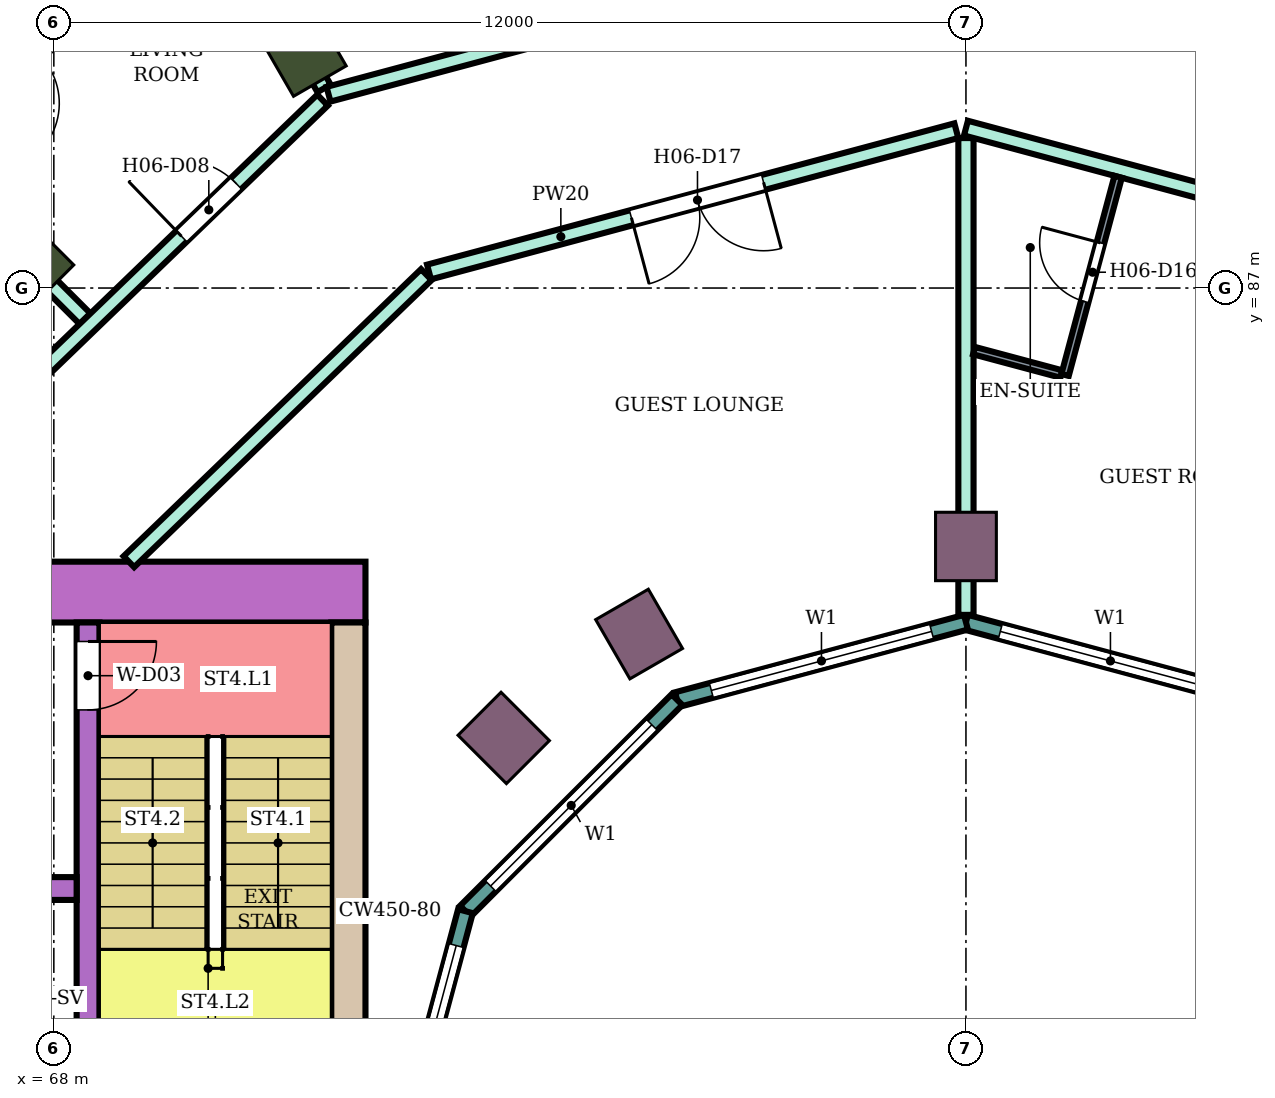
"""IFC4 building model, lengths in metres.
Left out: names, types, materials, properties, quantities, classifications, styles, units other than length and angle.
Written with IfcOpenShell. Run it as: python <this file> out.ifc"""

import sys

from ifc_helpers import new_model, si_unit, direction, frame, frame_2d, origin, origin_2d, place, context, subcontext, project, spatial, rectangle, extrude, element, fill, save


model = new_model("IFC4")
c1 = context("Model", 3, precision=1e-05, world=origin(), true_north=direction((0.0, 1.0)))
c2 = subcontext(c1, "Body", "Model", "MODEL_VIEW")
j1 = project(units=[si_unit("LENGTHUNIT", "METRE"), si_unit("PLANEANGLEUNIT", "RADIAN")], contexts=[c1])
p1 = place(None, origin())
s1 = spatial("IfcSite", under=j1, at=p1, CompositionType="ELEMENT")
p2 = place(p1, origin())
s2 = spatial("IfcBuilding", under=s1, at=p2, CompositionType="ELEMENT")
p3 = place(p2, frame((0.0, 0.0, 101.4)))
s3 = spatial("IfcBuildingStorey", under=s2, at=p3, CompositionType="ELEMENT", Elevation=101.4)
for number, where, z_axis, x_axis in (
    (1, (71.2, 90.242, 0.0), (0.0, 0.0, 1.0), (-0.5, 0.866, 0.0)),
    (2, (67.555, 87.445, 0.0), (0.0, 0.0, 1.0), (-0.707, 0.707, 0.0)),
):
    element("IfcColumn", number, at=place(p3, frame(where, z_axis=z_axis, x_axis=x_axis)), inside=s3, PredefinedType="COLUMN", context=c2, shape_type="SweptSolid", body=[
        extrude(rectangle(XDim=1.2, YDim=0.8, at=origin_2d()), origin(), (0.0, 0.0, 1.0), 3.8),
    ])
for number, where, z_axis, x_axis in (
    (3, (80.0, 83.6, 0.0), (0.0, 0.0, 1.0), (0.0, 1.0, 0.0)),
    (4, (75.7, 82.448, 0.0), (0.0, 0.0, 1.0), (-0.5, 0.866, 0.0)),
    (5, (73.919, 81.081, 0.0), (0.0, 0.0, 1.0), (-0.707, 0.707, 0.0)),
):
    element("IfcColumn", number, at=place(p3, frame(where, z_axis=z_axis, x_axis=x_axis)), inside=s3, PredefinedType="COLUMN", context=c2, shape_type="SweptSolid", body=[
        extrude(rectangle(XDim=0.9, YDim=0.8, at=origin_2d()), origin(), (0.0, 0.0, 1.0), 3.8),
    ])
p4 = place(p3, frame((72.1, 83.0, 0.0), z_axis=(0.0, 0.0, 1.0), x_axis=(-1.0, 0.0, 0.0)))
e6 = element("IfcWall", 6, at=p4, inside=s3, PredefinedType="SHEAR", context=c2, shape_type="SweptSolid", body=[
    extrude(rectangle(XDim=14.7, YDim=0.8, at=frame_2d((7.35, 0.0))), origin(), (0.0, 0.0, 1.0), 3.48),
])
p5 = place(p4, frame((4.2, 0.0, 0.0)))
e7 = element("IfcOpeningElement", 7, at=p5, cuts=e6, PredefinedType="OPENING", context=c2, shape_type="SweptSolid", body=[
    extrude(rectangle(XDim=2.4, YDim=2.4, at=frame_2d((1.2, 1.2))), frame((0.0, 0.41, 0.0), z_axis=(0.0, -1.0, 0.0), x_axis=(1.0, 0.0, 0.0)), (0.0, 0.0, 1.0), 0.82),
])
p6 = place(p3, frame((71.875, 82.6, 0.0), z_axis=(0.0, 0.0, 1.0), x_axis=(0.0, -1.0, 0.0)))
e8 = element("IfcWall", 8, at=p6, inside=s3, PredefinedType="SHEAR", context=c2, shape_type="SweptSolid", body=[
    extrude(rectangle(XDim=7.6, YDim=0.45, at=frame_2d((3.8, 0.0))), origin(), (0.0, 0.0, 1.0), 3.48),
])
p7 = place(p3, frame((68.45, 82.6, 0.0), z_axis=(0.0, 0.0, 1.0), x_axis=(0.0, -1.0, 0.0)))
e9 = element("IfcWall", 9, at=p7, inside=s3, PredefinedType="SHEAR", context=c2, shape_type="SweptSolid", body=[
    extrude(rectangle(XDim=7.6, YDim=0.3, at=frame_2d((3.8, 0.0))), origin(), (0.0, 0.0, 1.0), 3.48),
])
p8 = place(p7, frame((0.25, 0.0, 0.0)))
e10 = element("IfcOpeningElement", 10, at=p8, cuts=e9, PredefinedType="OPENING", context=c2, shape_type="SweptSolid", body=[
    extrude(rectangle(XDim=0.9, YDim=2.1, at=frame_2d((0.45, 1.05))), frame((0.0, 0.16, 0.0), z_axis=(0.0, -1.0, 0.0), x_axis=(1.0, 0.0, 0.0)), (0.0, 0.0, 1.0), 0.32),
])
p9 = place(p3, frame((68.3, 79.1, 0.0), z_axis=(0.0, 0.0, 1.0), x_axis=(-1.0, 0.0, 0.0)))
e11 = element("IfcWall", 11, at=p9, inside=s3, PredefinedType="SHEAR", context=c2, shape_type="SweptSolid", body=[
    extrude(rectangle(XDim=10.9, YDim=0.3, at=frame_2d((5.45, 0.0))), origin(), (0.0, 0.0, 1.0), 3.48),
])
p10 = place(p9, frame((0.4, 0.0, 0.0)))
e12 = element("IfcOpeningElement", 12, at=p10, cuts=e11, PredefinedType="OPENING", context=c2, shape_type="SweptSolid", body=[
    extrude(rectangle(XDim=1.4, YDim=2.1, at=frame_2d((0.7, 1.05))), frame((0.0, 0.16, 0.0), z_axis=(0.0, -1.0, 0.0), x_axis=(1.0, 0.0, 0.0)), (0.0, 0.0, 1.0), 0.32),
])
p11 = place(p9, frame((5.4, 0.0, 0.0)))
e13 = element("IfcOpeningElement", 13, at=p11, cuts=e11, PredefinedType="OPENING", context=c2, shape_type="SweptSolid", body=[
    extrude(rectangle(XDim=1.4, YDim=2.1, at=frame_2d((0.7, 1.05))), frame((0.0, 0.16, 0.0), z_axis=(0.0, -1.0, 0.0), x_axis=(1.0, 0.0, 0.0)), (0.0, 0.0, 1.0), 0.32),
])
p12 = place(p9, frame((8.1, 0.0, 0.0)))
e14 = element("IfcOpeningElement", 14, at=p12, cuts=e11, PredefinedType="OPENING", context=c2, shape_type="SweptSolid", body=[
    extrude(rectangle(XDim=1.0, YDim=2.1, at=frame_2d((0.5, 1.05))), frame((0.0, 0.16, 0.0), z_axis=(0.0, -1.0, 0.0), x_axis=(1.0, 0.0, 0.0)), (0.0, 0.0, 1.0), 0.32),
])
p13 = place(p3, frame((83.802, 81.585, 0.0), z_axis=(0.0, 0.0, 1.0), x_axis=(-0.965933654434, 0.258789828301, 0.0)))
e15 = element("IfcWall", 15, at=p13, inside=s3, PredefinedType="NOTDEFINED", context=c2, shape_type="SweptSolid", body=[
    extrude(rectangle(XDim=3.936, YDim=0.2, at=frame_2d((1.968, 0.0))), origin(), (0.0, 0.0, 1.0), 3.8),
])
p14 = place(p13, frame((0.468, 0.0, 0.9)))
e16 = element("IfcOpeningElement", 16, at=p14, cuts=e15, PredefinedType="OPENING", context=c2, shape_type="SweptSolid", body=[
    extrude(rectangle(XDim=3.0, YDim=2.3, at=frame_2d((1.5, 1.15))), frame((0.0, 0.11, 0.0), z_axis=(0.0, -1.0, 0.0), x_axis=(1.0, 0.0, 0.0)), (0.0, 0.0, 1.0), 0.22),
])
p15 = place(p3, frame((80.0, 82.604, 0.0), z_axis=(0.0, 0.0, 1.0), x_axis=(-0.965933654434, -0.258789828301, 0.0)))
e17 = element("IfcWall", 17, at=p15, inside=s3, PredefinedType="NOTDEFINED", context=c2, shape_type="SweptSolid", body=[
    extrude(rectangle(XDim=3.936, YDim=0.2, at=frame_2d((1.968, 0.0))), origin(), (0.0, 0.0, 1.0), 3.8),
])
p16 = place(p15, frame((0.468, 0.0, 0.9)))
e18 = element("IfcOpeningElement", 18, at=p16, cuts=e17, PredefinedType="OPENING", context=c2, shape_type="SweptSolid", body=[
    extrude(rectangle(XDim=3.0, YDim=2.3, at=frame_2d((1.5, 1.15))), frame((0.0, 0.11, 0.0), z_axis=(0.0, -1.0, 0.0), x_axis=(1.0, 0.0, 0.0)), (0.0, 0.0, 1.0), 0.22),
])
p17 = place(p3, frame((76.198, 81.585, 0.0), z_axis=(0.0, 0.0, 1.0), x_axis=(-0.707106781187, -0.707106781187, 0.0)))
e19 = element("IfcWall", 19, at=p17, inside=s3, PredefinedType="NOTDEFINED", context=c2, shape_type="SweptSolid", body=[
    extrude(rectangle(XDim=3.936, YDim=0.2, at=frame_2d((1.968, 0.0))), origin(), (0.0, 0.0, 1.0), 3.8),
])
p18 = place(p17, frame((0.468, 0.0, 0.9)))
e20 = element("IfcOpeningElement", 20, at=p18, cuts=e19, PredefinedType="OPENING", context=c2, shape_type="SweptSolid", body=[
    extrude(rectangle(XDim=3.0, YDim=2.3, at=frame_2d((1.5, 1.15))), frame((0.0, 0.11, 0.0), z_axis=(0.0, -1.0, 0.0), x_axis=(1.0, 0.0, 0.0)), (0.0, 0.0, 1.0), 0.22),
])
p19 = place(p3, frame((73.415, 78.802, 0.0), z_axis=(0.0, 0.0, 1.0), x_axis=(-0.258789828301, -0.965933654434, 0.0)))
e21 = element("IfcWall", 21, at=p19, inside=s3, PredefinedType="NOTDEFINED", context=c2, shape_type="SweptSolid", body=[
    extrude(rectangle(XDim=3.936, YDim=0.2, at=frame_2d((1.968, 0.0))), origin(), (0.0, 0.0, 1.0), 3.8),
])
p20 = place(p19, frame((0.468, 0.0, 0.9)))
e22 = element("IfcOpeningElement", 22, at=p20, cuts=e21, PredefinedType="OPENING", context=c2, shape_type="SweptSolid", body=[
    extrude(rectangle(XDim=3.0, YDim=2.3, at=frame_2d((1.5, 1.15))), frame((0.0, 0.11, 0.0), z_axis=(0.0, -1.0, 0.0), x_axis=(1.0, 0.0, 0.0)), (0.0, 0.0, 1.0), 0.22),
])
p21 = place(p3, frame((63.6, 91.409, 0.0), z_axis=(0.0, 0.0, 1.0), x_axis=(0.706945318761, -0.707268206752, 0.0)))
e23 = element("IfcWall", 23, at=p21, inside=s3, PredefinedType="PARTITIONING", context=c2, shape_type="SweptSolid", body=[
    extrude(rectangle(XDim=6.805, YDim=0.2, at=frame_2d((3.402, 0.0))), origin(), (0.0, 0.0, 1.0), 3.35),
])
p22 = place(p3, frame((66.796, 84.9, 0.0), z_axis=(0.0, 0.0, 1.0), x_axis=(0.719690784855, 0.694294731505, 0.0)))
e24 = element("IfcWall", 24, at=p22, inside=s3, PredefinedType="PARTITIONING", context=c2, shape_type="SweptSolid", body=[
    extrude(rectangle(XDim=6.585, YDim=0.2, at=frame_2d((3.292, 0.0))), origin(), (0.0, 0.0, 1.0), 3.35),
])
p23 = place(p22, frame((4.006, 0.0, 0.0)))
e25 = element("IfcOpeningElement", 25, at=p23, cuts=e24, PredefinedType="OPENING", context=c2, shape_type="SweptSolid", body=[
    extrude(rectangle(XDim=1.0, YDim=2.1, at=frame_2d((0.5, 1.05))), frame((0.0, 0.11, 0.0), z_axis=(0.0, -1.0, 0.0), x_axis=(1.0, 0.0, 0.0)), (0.0, 0.0, 1.0), 0.22),
])
p24 = place(p3, frame((67.102, 97.342, 0.0), z_axis=(0.0, 0.0, 1.0), x_axis=(0.499900389553, -0.866082906265, 0.0)))
e26 = element("IfcWall", 26, at=p24, inside=s3, PredefinedType="PARTITIONING", context=c2, shape_type="SweptSolid", body=[
    extrude(rectangle(XDim=8.908, YDim=0.2, at=frame_2d((4.454, 0.0))), origin(), (0.0, 0.0, 1.0), 3.35),
])
p25 = place(p3, frame((68.987, 83.4, 0.0), z_axis=(0.0, 0.0, 1.0), x_axis=(0.719586298962, 0.694403022997, 0.0)))
e27 = element("IfcWall", 27, at=p25, inside=s3, PredefinedType="PARTITIONING", context=c2, shape_type="SweptSolid", body=[
    extrude(rectangle(XDim=5.439, YDim=0.2, at=frame_2d((2.719, 0.0))), origin(), (0.0, 0.0, 1.0), 3.35),
])
p26 = place(p3, frame((71.614, 89.55, 0.0), z_axis=(0.0, 0.0, 1.0), x_axis=(0.965982378603, 0.258607896685, 0.0)))
e28 = element("IfcWall", 28, at=p26, inside=s3, PredefinedType="PARTITIONING", context=c2, shape_type="SweptSolid", body=[
    extrude(rectangle(XDim=8.632, YDim=0.2, at=frame_2d((4.316, 0.0))), origin(), (0.0, 0.0, 1.0), 3.35),
])
p27 = place(p26, frame((2.804, 0.0, 0.0)))
e29 = element("IfcOpeningElement", 29, at=p27, cuts=e28, PredefinedType="OPENING", context=c2, shape_type="SweptSolid", body=[
    extrude(rectangle(XDim=1.0, YDim=2.1, at=frame_2d((0.5, 1.05))), frame((0.0, 0.11, 0.0), z_axis=(0.0, -1.0, 0.0), x_axis=(1.0, 0.0, 0.0)), (0.0, 0.0, 1.0), 0.22),
])
p28 = place(p3, frame((72.936, 87.211, 0.0), z_axis=(0.0, 0.0, 1.0), x_axis=(0.965917703859, 0.258849356521, 0.0)))
e30 = element("IfcWall", 30, at=p28, inside=s3, PredefinedType="PARTITIONING", context=c2, shape_type="SweptSolid", body=[
    extrude(rectangle(XDim=7.182, YDim=0.2, at=frame_2d((3.591, 0.0))), origin(), (0.0, 0.0, 1.0), 3.35),
])
p29 = place(p28, frame((2.757, 0.0, 0.0)))
e31 = element("IfcOpeningElement", 31, at=p29, cuts=e30, PredefinedType="OPENING", context=c2, shape_type="SweptSolid", body=[
    extrude(rectangle(XDim=1.8, YDim=2.1, at=frame_2d((0.9, 1.05))), frame((0.0, 0.11, 0.0), z_axis=(0.0, -1.0, 0.0), x_axis=(1.0, 0.0, 0.0)), (0.0, 0.0, 1.0), 0.22),
])
p30 = place(p3, frame((80.0, 82.7, 0.0), z_axis=(0.0, 0.0, 1.0), x_axis=(0.0, 1.0, 0.0)))
e32 = element("IfcWall", 32, at=p30, inside=s3, PredefinedType="PARTITIONING", context=c2, shape_type="SweptSolid", body=[
    extrude(rectangle(XDim=6.273, YDim=0.2, at=frame_2d((3.136, 0.0))), origin(), (0.0, 0.0, 1.0), 3.35),
])
p31 = place(p3, frame((80.0, 89.104, 0.0), z_axis=(0.0, 0.0, 1.0), x_axis=(0.965856548257, -0.259077455964, 0.0)))
e33 = element("IfcWall", 33, at=p31, inside=s3, PredefinedType="PARTITIONING", context=c2, shape_type="SweptSolid", body=[
    extrude(rectangle(XDim=7.173, YDim=0.2, at=frame_2d((3.586, 0.0))), origin(), (0.0, 0.0, 1.0), 3.35),
])
p32 = place(p31, frame((5.763, 0.0, 0.0)))
e34 = element("IfcOpeningElement", 34, at=p32, cuts=e33, PredefinedType="OPENING", context=c2, shape_type="SweptSolid", body=[
    extrude(rectangle(XDim=1.0, YDim=2.1, at=frame_2d((0.5, 1.05))), frame((0.0, 0.11, 0.0), z_axis=(0.0, -1.0, 0.0), x_axis=(1.0, 0.0, 0.0)), (0.0, 0.0, 1.0), 0.22),
])
p33 = place(p3, frame((80.0, 91.796, 0.0), z_axis=(0.0, 0.0, 1.0), x_axis=(0.965917643923, -0.258849580177, 0.0)))
e35 = element("IfcWall", 35, at=p33, inside=s3, PredefinedType="PARTITIONING", context=c2, shape_type="SweptSolid", body=[
    extrude(rectangle(XDim=8.602, YDim=0.2, at=frame_2d((4.301, 0.0))), origin(), (0.0, 0.0, 1.0), 3.35),
])
p34 = place(p33, frame((2.091, 0.0, 0.0)))
e36 = element("IfcOpeningElement", 36, at=p34, cuts=e35, PredefinedType="OPENING", context=c2, shape_type="SweptSolid", body=[
    extrude(rectangle(XDim=1.8, YDim=2.1, at=frame_2d((0.9, 1.05))), frame((0.0, 0.11, 0.0), z_axis=(0.0, -1.0, 0.0), x_axis=(1.0, 0.0, 0.0)), (0.0, 0.0, 1.0), 0.22),
])
p35 = place(p3, frame((66.436, 88.72, 0.0), z_axis=(0.0, 0.0, 1.0), x_axis=(0.719585934284, 0.694403400899, 0.0)))
e37 = element("IfcWall", 37, at=p35, inside=s3, PredefinedType="PARTITIONING", context=c2, shape_type="SweptSolid", body=[
    extrude(rectangle(XDim=4.925, YDim=0.1, at=frame_2d((2.462, 0.0))), origin(), (0.0, 0.0, 1.0), 3.35),
])
p36 = place(p35, frame((1.022, 0.0, 0.0)))
e38 = element("IfcOpeningElement", 38, at=p36, cuts=e37, PredefinedType="OPENING", context=c2, shape_type="SweptSolid", body=[
    extrude(rectangle(XDim=0.9, YDim=2.1, at=frame_2d((0.45, 1.05))), frame((0.0, 0.06, 0.0), z_axis=(0.0, -1.0, 0.0), x_axis=(1.0, 0.0, 0.0)), (0.0, 0.0, 1.0), 0.12),
])
p37 = place(p3, frame((80.106, 86.177, 0.0), z_axis=(0.0, 0.0, 1.0), x_axis=(0.966002973184, -0.258530957139, 0.0)))
e39 = element("IfcWall", 39, at=p37, inside=s3, PredefinedType="PARTITIONING", context=c2, shape_type="SweptSolid", body=[
    extrude(rectangle(XDim=1.19, YDim=0.1, at=frame_2d((0.595, 0.0))), origin(), (0.0, 0.0, 1.0), 3.35),
])
p38 = place(p3, frame((81.304, 85.856, 0.0), z_axis=(0.0, 0.0, 1.0), x_axis=(0.25867580527, 0.965964195904, 0.0)))
e40 = element("IfcWall", 40, at=p38, inside=s3, PredefinedType="PARTITIONING", context=c2, shape_type="SweptSolid", body=[
    extrude(rectangle(XDim=2.699, YDim=0.1, at=frame_2d((1.35, 0.0))), origin(), (0.0, 0.0, 1.0), 3.35),
])
p39 = place(p38, frame((1.0, 0.0, 0.0)))
e41 = element("IfcOpeningElement", 41, at=p39, cuts=e40, PredefinedType="OPENING", context=c2, shape_type="SweptSolid", body=[
    extrude(rectangle(XDim=0.8, YDim=2.1, at=frame_2d((0.4, 1.05))), frame((0.0, 0.06, 0.0), z_axis=(0.0, -1.0, 0.0), x_axis=(1.0, 0.0, 0.0)), (0.0, 0.0, 1.0), 0.12),
])
p40 = place(p14, origin())
e42 = element("IfcWindow", 42, at=p40, inside=s3, PartitioningType="SINGLE_PANEL", PredefinedType="WINDOW", context=c2, shape_type="SweptSolid", body=[
    extrude(rectangle(XDim=3.0, YDim=2.3, at=frame_2d((1.5, 1.15))), frame((0.0, 0.03, 0.0), z_axis=(0.0, -1.0, 0.0), x_axis=(1.0, 0.0, 0.0)), (0.0, 0.0, 1.0), 0.06),
])
fill(e16, e42)
p41 = place(p16, origin())
e43 = element("IfcWindow", 43, at=p41, inside=s3, PartitioningType="SINGLE_PANEL", PredefinedType="WINDOW", context=c2, shape_type="SweptSolid", body=[
    extrude(rectangle(XDim=3.0, YDim=2.3, at=frame_2d((1.5, 1.15))), frame((0.0, 0.03, 0.0), z_axis=(0.0, -1.0, 0.0), x_axis=(1.0, 0.0, 0.0)), (0.0, 0.0, 1.0), 0.06),
])
fill(e18, e43)
p42 = place(p18, origin())
e44 = element("IfcWindow", 44, at=p42, inside=s3, PartitioningType="SINGLE_PANEL", PredefinedType="WINDOW", context=c2, shape_type="SweptSolid", body=[
    extrude(rectangle(XDim=3.0, YDim=2.3, at=frame_2d((1.5, 1.15))), frame((0.0, 0.03, 0.0), z_axis=(0.0, -1.0, 0.0), x_axis=(1.0, 0.0, 0.0)), (0.0, 0.0, 1.0), 0.06),
])
fill(e20, e44)
p43 = place(p20, origin())
e45 = element("IfcWindow", 45, at=p43, inside=s3, PartitioningType="SINGLE_PANEL", PredefinedType="WINDOW", context=c2, shape_type="SweptSolid", body=[
    extrude(rectangle(XDim=3.0, YDim=2.3, at=frame_2d((1.5, 1.15))), frame((0.0, 0.03, 0.0), z_axis=(0.0, -1.0, 0.0), x_axis=(1.0, 0.0, 0.0)), (0.0, 0.0, 1.0), 0.06),
])
fill(e22, e45)
p44 = place(p23, origin())
e46 = element("IfcDoor", 46, at=p44, inside=s3, OperationType="SINGLE_SWING_LEFT", PredefinedType="DOOR", context=c2, shape_type="SweptSolid", body=[
    extrude(rectangle(XDim=1.0, YDim=2.1, at=frame_2d((0.5, 1.05))), frame((0.0, 0.025, 0.0), z_axis=(0.0, -1.0, 0.0), x_axis=(1.0, 0.0, 0.0)), (0.0, 0.0, 1.0), 0.05),
])
fill(e25, e46)
p45 = place(p39, origin())
e47 = element("IfcDoor", 47, at=p45, inside=s3, OperationType="SINGLE_SWING_RIGHT", PredefinedType="DOOR", context=c2, shape_type="SweptSolid", body=[
    extrude(rectangle(XDim=0.8, YDim=2.1, at=frame_2d((0.4, 1.05))), frame((0.0, 0.025, 0.0), z_axis=(0.0, -1.0, 0.0), x_axis=(1.0, 0.0, 0.0)), (0.0, 0.0, 1.0), 0.05),
])
fill(e41, e47)
p46 = place(p29, frame((1.8, 0.0, 0.0), z_axis=(0.0, 0.0, 1.0), x_axis=(-1.0, 0.0, 0.0)))
e48 = element("IfcDoor", 48, at=p46, inside=s3, OperationType="DOUBLE_DOOR_SINGLE_SWING", PredefinedType="DOOR", context=c2, shape_type="SweptSolid", body=[
    extrude(rectangle(XDim=1.8, YDim=2.1, at=frame_2d((0.9, 1.05))), frame((0.0, 0.025, 0.0), z_axis=(0.0, -1.0, 0.0), x_axis=(1.0, 0.0, 0.0)), (0.0, 0.0, 1.0), 0.05),
])
fill(e31, e48)
p47 = place(p8, origin())
e49 = element("IfcDoor", 49, at=p47, inside=s3, OperationType="SINGLE_SWING_LEFT", PredefinedType="DOOR", context=c2, shape_type="SweptSolid", body=[
    extrude(rectangle(XDim=0.9, YDim=2.1, at=frame_2d((0.45, 1.05))), frame((0.0, 0.025, 0.0), z_axis=(0.0, -1.0, 0.0), x_axis=(1.0, 0.0, 0.0)), (0.0, 0.0, 1.0), 0.05),
])
fill(e10, e49)
save(model, sys.argv[1])
